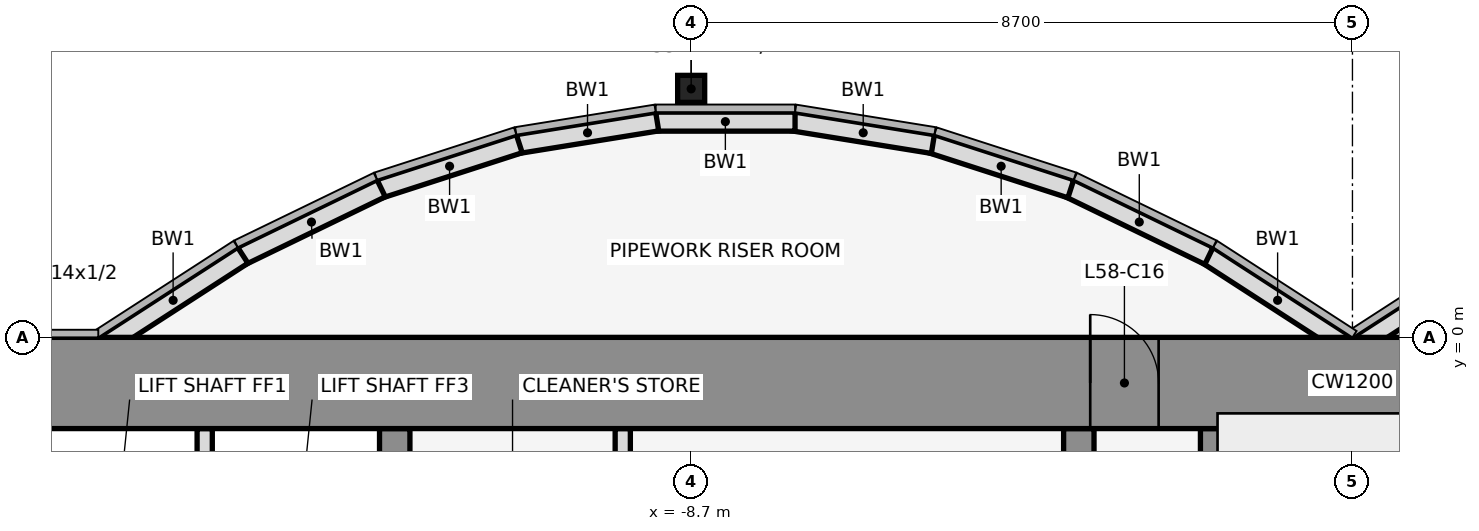
"""IFC4 building model, lengths in metres.
Left out: names, types, materials, properties, quantities, classifications, styles, units other than length and angle.
Written with IfcOpenShell. Run it as: python <this file> out.ifc"""

import sys

from ifc_helpers import new_model, si_unit, direction, frame, frame_2d, origin, origin_2d, place, context, subcontext, project, spatial, rectangle, hollow_rectangle, extrude, element, fill, save


model = new_model("IFC4")
c1 = context("Model", 3, precision=1e-05, world=origin(), true_north=direction((0.0, 1.0)))
c2 = subcontext(c1, "Body", "Model", "MODEL_VIEW")
j1 = project(units=[si_unit("LENGTHUNIT", "METRE"), si_unit("PLANEANGLEUNIT", "RADIAN")], contexts=[c1])
p1 = place(None, origin())
s1 = spatial("IfcSite", under=j1, at=p1, CompositionType="ELEMENT")
p2 = place(p1, origin())
s2 = spatial("IfcBuilding", under=s1, at=p2, CompositionType="ELEMENT")
p3 = place(p2, frame((0.0, 0.0, 258.2)))
s3 = spatial("IfcBuildingStorey", under=s2, at=p3, CompositionType="ELEMENT", Elevation=258.2)
p4 = place(p3, frame((-8.7, 3.269, 0.0), z_axis=(0.0, 0.0, 1.0), x_axis=(1.0, 0.0, 0.0)))
e1 = element("IfcColumn", 1, at=p4, inside=s3, PredefinedType="COLUMN", context=c2, shape_type="SweptSolid", body=[
    extrude(hollow_rectangle(XDim=0.356, YDim=0.356, WallThickness=0.012, at=origin_2d()), origin(), (0.0, 0.0, 1.0), 4.2),
])
for number, where, z_axis, x_axis in (
    (2, (1.901, 1.08, 0.0), (0.0, 0.0, 1.0), (-0.84, -0.543, 0.0)),
    (3, (-0.068, -0.105, 0.0), (0.0, 0.0, 1.0), (-0.84, 0.543, 0.0)),
):
    element("IfcWall", number, at=place(p3, frame(where, z_axis=z_axis, x_axis=x_axis)), inside=s3, PredefinedType="STANDARD", context=c2, shape_type="SweptSolid", body=[
        extrude(rectangle(XDim=2.183, YDim=0.25, at=frame_2d((1.091, 0.0))), origin(), (0.0, 0.0, 1.0), 4.05),
    ])
p5 = place(p3, frame((-1.888, 1.073, 0.0), z_axis=(0.0, 0.0, 1.0), x_axis=(-0.89982408427, 0.436252928206, 0.0)))
e4 = element("IfcWall", 4, at=p5, inside=s3, PredefinedType="STANDARD", context=c2, shape_type="SweptSolid", body=[
    extrude(rectangle(XDim=2.038, YDim=0.25, at=frame_2d((1.019, 0.0))), origin(), (0.0, 0.0, 1.0), 4.05),
])
p6 = place(p3, frame((-3.705, 1.955, 0.0), z_axis=(0.0, 0.0, 1.0), x_axis=(-0.951495806175, 0.307661714928, 0.0)))
e5 = element("IfcWall", 5, at=p6, inside=s3, PredefinedType="STANDARD", context=c2, shape_type="SweptSolid", body=[
    extrude(rectangle(XDim=1.927, YDim=0.25, at=frame_2d((0.963, 0.0))), origin(), (0.0, 0.0, 1.0), 4.05),
])
p7 = place(p3, frame((-5.52, 2.543, 0.0), z_axis=(0.0, 0.0, 1.0), x_axis=(-0.987181718931, 0.159600293885, 0.0)))
e6 = element("IfcWall", 6, at=p7, inside=s3, PredefinedType="STANDARD", context=c2, shape_type="SweptSolid", body=[
    extrude(rectangle(XDim=1.857, YDim=0.25, at=frame_2d((0.929, 0.0))), origin(), (0.0, 0.0, 1.0), 4.05),
])
p8 = place(p3, frame((-7.333, 2.838, 0.0), z_axis=(0.0, 0.0, 1.0), x_axis=(-1.0, 0.0, 0.0)))
e7 = element("IfcWall", 7, at=p8, inside=s3, PredefinedType="STANDARD", context=c2, shape_type="SweptSolid", body=[
    extrude(rectangle(XDim=1.833, YDim=0.25, at=frame_2d((0.917, 0.0))), origin(), (0.0, 0.0, 1.0), 4.05),
])
p9 = place(p3, frame((-9.147, 2.84, 0.0), z_axis=(0.0, 0.0, 1.0), x_axis=(-0.987181718931, -0.159600293885, 0.0)))
e8 = element("IfcWall", 8, at=p9, inside=s3, PredefinedType="STANDARD", context=c2, shape_type="SweptSolid", body=[
    extrude(rectangle(XDim=1.857, YDim=0.25, at=frame_2d((0.929, 0.0))), origin(), (0.0, 0.0, 1.0), 4.05),
])
p10 = place(p3, frame((-10.962, 2.548, 0.0), z_axis=(0.0, 0.0, 1.0), x_axis=(-0.951495806175, -0.307661714928, 0.0)))
e9 = element("IfcWall", 9, at=p10, inside=s3, PredefinedType="STANDARD", context=c2, shape_type="SweptSolid", body=[
    extrude(rectangle(XDim=1.927, YDim=0.25, at=frame_2d((0.963, 0.0))), origin(), (0.0, 0.0, 1.0), 4.05),
])
p11 = place(p3, frame((-12.779, 1.962, 0.0), z_axis=(0.0, 0.0, 1.0), x_axis=(-0.89982408427, -0.436252928206, 0.0)))
e10 = element("IfcWall", 10, at=p11, inside=s3, PredefinedType="STANDARD", context=c2, shape_type="SweptSolid", body=[
    extrude(rectangle(XDim=2.038, YDim=0.25, at=frame_2d((1.019, 0.0))), origin(), (0.0, 0.0, 1.0), 4.05),
])
p12 = place(p3, frame((-14.599, 1.08, 0.0), z_axis=(0.0, 0.0, 1.0), x_axis=(-0.83981312244, -0.542875602121, 0.0)))
e11 = element("IfcWall", 11, at=p12, inside=s3, PredefinedType="STANDARD", context=c2, shape_type="SweptSolid", body=[
    extrude(rectangle(XDim=2.183, YDim=0.25, at=frame_2d((1.091, 0.0))), origin(), (0.0, 0.0, 1.0), 4.05),
])
p13 = place(p3, frame((-15.1, -4.6, 0.0), z_axis=(0.0, 0.0, 1.0), x_axis=(0.0, 1.0, 0.0)))
e12 = element("IfcWall", 12, at=p13, inside=s3, PredefinedType="PARTITIONING", context=c2, shape_type="SweptSolid", body=[
    extrude(rectangle(XDim=3.4, YDim=0.2, at=frame_2d((1.7, 0.0))), origin(), (0.0, 0.0, 1.0), 3.118),
])
p14 = place(p3, frame((-12.6, -11.8, 0.0), z_axis=(0.0, 0.0, 1.0), x_axis=(0.0, 1.0, 0.0)))
e13 = element("IfcWall", 13, at=p14, inside=s3, PredefinedType="SHEAR", context=c2, shape_type="SweptSolid", body=[
    extrude(rectangle(XDim=10.6, YDim=0.4, at=frame_2d((5.3, 0.0))), origin(), (0.0, 0.0, 1.0), 4.2),
])
p15 = place(p14, frame((4.75, 0.0, 0.0)))
e14 = element("IfcOpeningElement", 14, at=p15, cuts=e13, PredefinedType="OPENING", context=c2, shape_type="SweptSolid", body=[
    extrude(rectangle(XDim=1.1, YDim=2.1, at=frame_2d((0.55, 1.05))), frame((0.0, 0.212, 0.0), z_axis=(0.0, -1.0, 0.0), x_axis=(1.0, 0.0, 0.0)), (0.0, 0.0, 1.0), 0.424),
])
p16 = place(p3, frame((-9.6, -4.6, 0.0), z_axis=(0.0, 0.0, 1.0), x_axis=(0.0, 1.0, 0.0)))
e15 = element("IfcWall", 15, at=p16, inside=s3, PredefinedType="PARTITIONING", context=c2, shape_type="SweptSolid", body=[
    extrude(rectangle(XDim=3.4, YDim=0.2, at=frame_2d((1.7, 0.0))), origin(), (0.0, 0.0, 1.0), 3.118),
])
p17 = place(p3, frame((-3.6, -11.8, 0.0), z_axis=(0.0, 0.0, 1.0), x_axis=(0.0, 1.0, 0.0)))
e16 = element("IfcWall", 16, at=p17, inside=s3, PredefinedType="SHEAR", context=c2, shape_type="SweptSolid", body=[
    extrude(rectangle(XDim=10.6, YDim=0.4, at=frame_2d((5.3, 0.0))), origin(), (0.0, 0.0, 1.0), 4.2),
])
p18 = place(p17, frame((4.85, 0.0, 0.0)))
e17 = element("IfcOpeningElement", 17, at=p18, cuts=e16, PredefinedType="OPENING", context=c2, shape_type="SweptSolid", body=[
    extrude(rectangle(XDim=0.9, YDim=2.1, at=frame_2d((0.45, 1.05))), frame((0.0, 0.212, 0.0), z_axis=(0.0, -1.0, 0.0), x_axis=(1.0, 0.0, 0.0)), (0.0, 0.0, 1.0), 0.424),
])
p19 = place(p3, frame((-1.8, -11.8, 0.0), z_axis=(0.0, 0.0, 1.0), x_axis=(0.0, 1.0, 0.0)))
e18 = element("IfcWall", 18, at=p19, inside=s3, PredefinedType="SHEAR", context=c2, shape_type="SweptSolid", body=[
    extrude(rectangle(XDim=10.6, YDim=0.4, at=frame_2d((5.3, 0.0))), origin(), (0.0, 0.0, 1.0), 4.2),
])
p20 = place(p3, frame((-22.0, -0.6, 0.0), z_axis=(0.0, 0.0, 1.0), x_axis=(1.0, 0.0, 0.0)))
e19 = element("IfcWall", 19, at=p20, inside=s3, PredefinedType="SHEAR", context=c2, shape_type="SweptSolid", body=[
    extrude(rectangle(XDim=44.0, YDim=1.2, at=frame_2d((22.0, 0.0))), origin(), (0.0, 0.0, 1.0), 4.2),
])
p21 = place(p20, frame((18.55, 0.0, 0.0)))
e20 = element("IfcOpeningElement", 20, at=p21, cuts=e19, PredefinedType="OPENING", context=c2, shape_type="SweptSolid", body=[
    extrude(rectangle(XDim=0.9, YDim=2.1, at=frame_2d((0.45, 1.05))), frame((0.0, 0.612, 0.0), z_axis=(0.0, -1.0, 0.0), x_axis=(1.0, 0.0, 0.0)), (0.0, 0.0, 1.0), 1.224),
])
p22 = place(p20, frame((24.55, 0.0, 0.0)))
e21 = element("IfcOpeningElement", 21, at=p22, cuts=e19, PredefinedType="OPENING", context=c2, shape_type="SweptSolid", body=[
    extrude(rectangle(XDim=0.9, YDim=2.1, at=frame_2d((0.45, 1.05))), frame((0.0, 0.612, 0.0), z_axis=(0.0, -1.0, 0.0), x_axis=(1.0, 0.0, 0.0)), (0.0, 0.0, 1.0), 1.224),
])
p23 = place(p21, origin())
e22 = element("IfcDoor", 22, at=p23, inside=s3, OperationType="SINGLE_SWING_LEFT", PredefinedType="DOOR", context=c2, shape_type="SweptSolid", body=[
    extrude(rectangle(XDim=0.9, YDim=2.1, at=frame_2d((0.45, 1.05))), frame((0.0, 0.025, 0.0), z_axis=(0.0, -1.0, 0.0), x_axis=(1.0, 0.0, 0.0)), (0.0, 0.0, 1.0), 0.05),
])
fill(e20, e22)
save(model, sys.argv[1])
